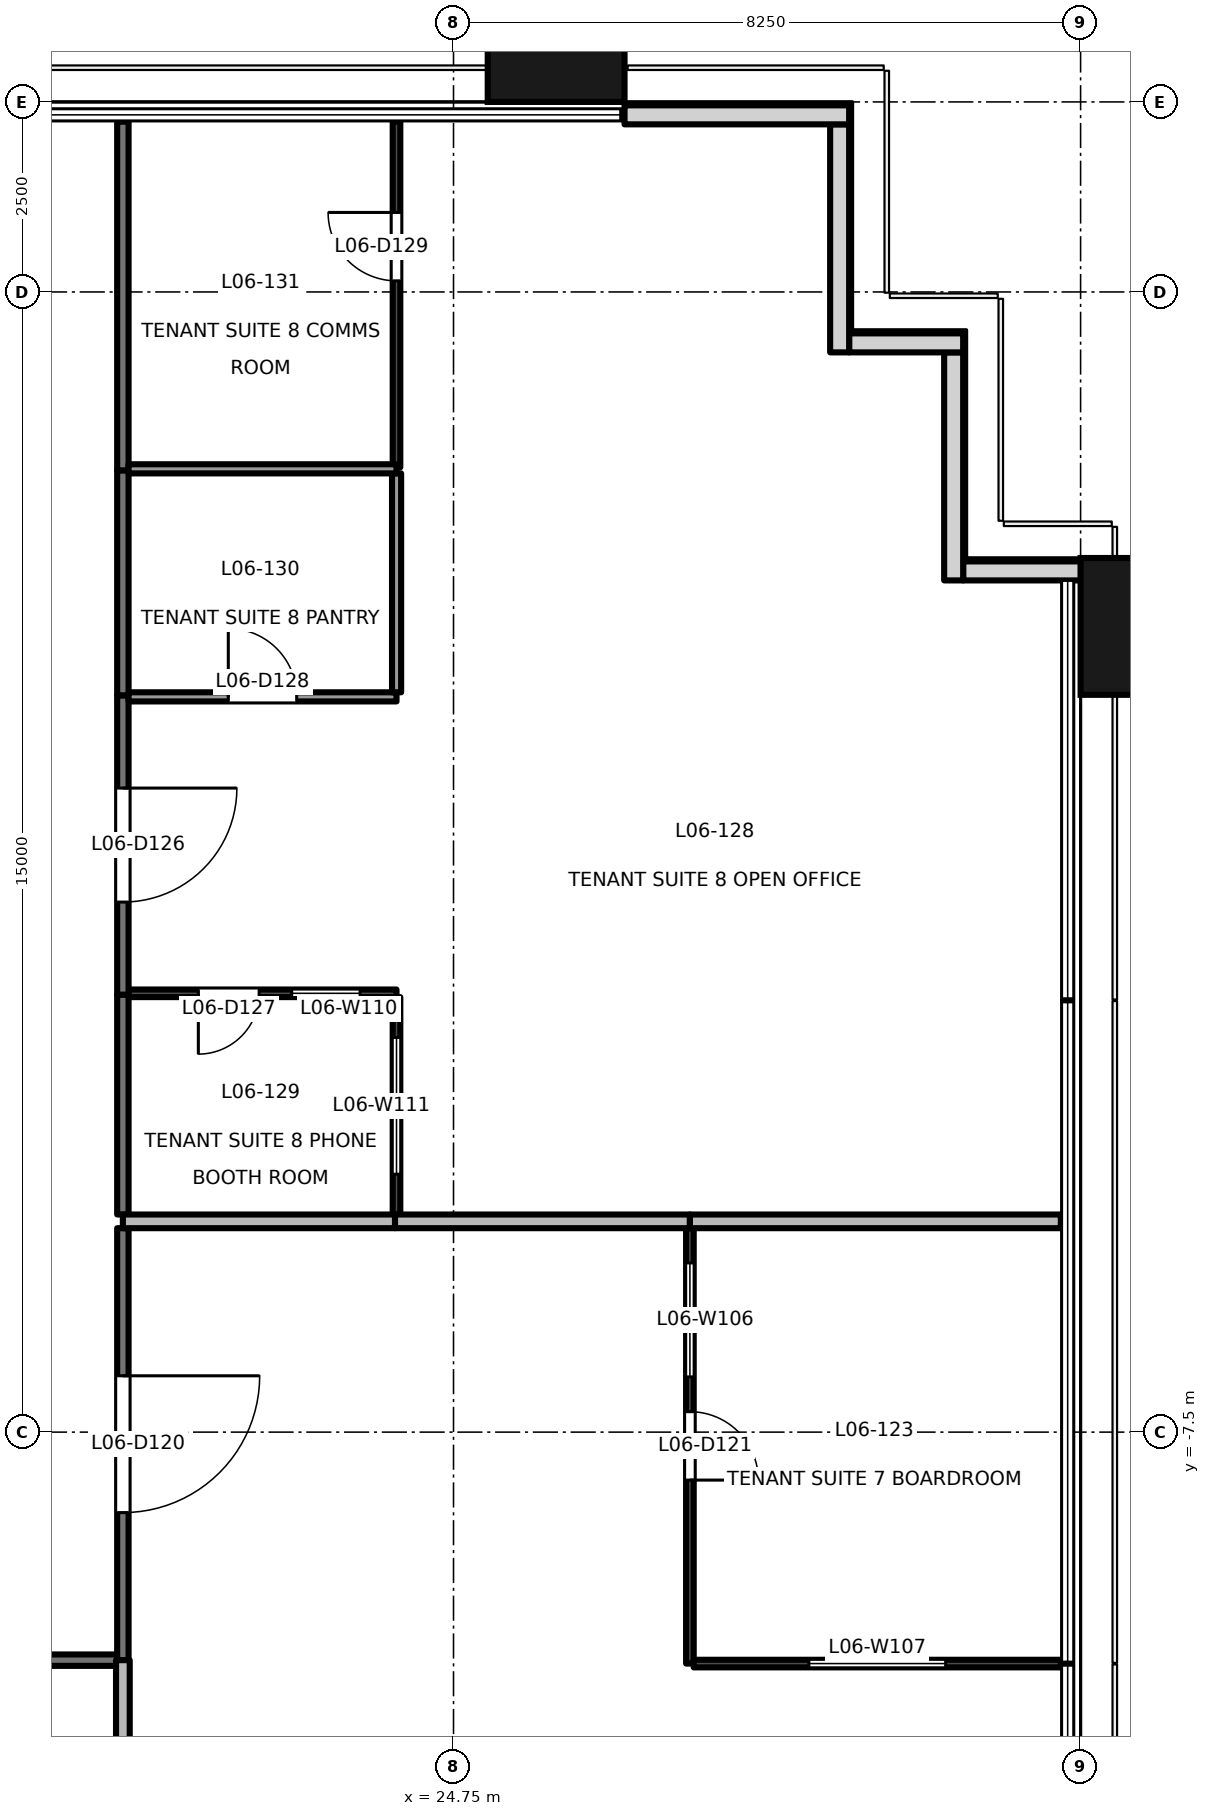
"""IFC4 building model, lengths in metres.
Left out: names, types, materials, properties, quantities, classifications, styles, units other than length and angle.
Written with IfcOpenShell. Run it as: python <this file> out.ifc"""

import sys

from ifc_helpers import new_model, si_unit, direction, frame, frame_2d, origin, origin_2d, place, context, subcontext, project, spatial, rectangle, extrude, element, fill, save


model = new_model("IFC4")
c1 = context("Model", 3, precision=1e-05, world=origin(), true_north=direction((0.0, 1.0)))
c2 = subcontext(c1, "Body", "Model", "MODEL_VIEW")
j1 = project(units=[si_unit("LENGTHUNIT", "METRE"), si_unit("PLANEANGLEUNIT", "RADIAN")], contexts=[c1])
p1 = place(None, origin())
s1 = spatial("IfcSite", under=j1, at=p1, CompositionType="ELEMENT")
p2 = place(p1, origin())
s2 = spatial("IfcBuilding", under=s1, at=p2, CompositionType="ELEMENT")
p3 = place(p2, frame((0.0, 0.0, 32.4)))
s3 = spatial("IfcBuildingStorey", under=s2, at=p3, CompositionType="ELEMENT", Elevation=32.4)
for number, where, z_axis, x_axis in (
    (1, (33.9, 3.1, -0.2), (0.0, 0.0, 1.0), (0.0, 1.0, 0.0)),
    (2, (26.1, 10.9, -0.2), (0.0, 0.0, 1.0), (1.0, 0.0, 0.0)),
):
    element("IfcColumn", number, at=place(p3, frame(where, z_axis=z_axis, x_axis=x_axis)), inside=s3, PredefinedType="COLUMN", context=c2, shape_type="SweptSolid", body=[
        extrude(rectangle(XDim=1.8, YDim=1.8, at=origin_2d()), origin(), (0.0, 0.0, 1.0), 4.1),
    ])
p4 = place(p3, frame((33.005, 3.83, 0.0), z_axis=(0.0, 0.0, 1.0), x_axis=(-1.0, 0.0, 0.0)))
e3 = element("IfcWall", 3, at=p4, inside=s3, PredefinedType="SOLIDWALL", context=c2, shape_type="SweptSolid", body=[
    extrude(rectangle(XDim=1.55, YDim=0.25, at=frame_2d((0.775, 0.0))), origin(), (0.0, 0.0, 1.0), 3.9),
])
p5 = place(p3, frame((31.33, 3.705, 0.0), z_axis=(0.0, 0.0, 1.0), x_axis=(0.0, 1.0, 0.0)))
e4 = element("IfcWall", 4, at=p5, inside=s3, PredefinedType="SOLIDWALL", context=c2, shape_type="SweptSolid", body=[
    extrude(rectangle(XDim=3.0, YDim=0.25, at=frame_2d((1.5, 0.0))), origin(), (0.0, 0.0, 1.0), 3.9),
])
p6 = place(p3, frame((31.455, 6.83, 0.0), z_axis=(0.0, 0.0, 1.0), x_axis=(-1.0, 0.0, 0.0)))
e5 = element("IfcWall", 5, at=p6, inside=s3, PredefinedType="SOLIDWALL", context=c2, shape_type="SweptSolid", body=[
    extrude(rectangle(XDim=1.5, YDim=0.25, at=frame_2d((0.75, 0.0))), origin(), (0.0, 0.0, 1.0), 3.9),
])
p7 = place(p3, frame((29.83, 6.705, 0.0), z_axis=(0.0, 0.0, 1.0), x_axis=(0.0, 1.0, 0.0)))
e6 = element("IfcWall", 6, at=p7, inside=s3, PredefinedType="SOLIDWALL", context=c2, shape_type="SweptSolid", body=[
    extrude(rectangle(XDim=3.0, YDim=0.25, at=frame_2d((1.5, 0.0))), origin(), (0.0, 0.0, 1.0), 3.9),
])
p8 = place(p3, frame((29.955, 9.83, 0.0), z_axis=(0.0, 0.0, 1.0), x_axis=(-1.0, 0.0, 0.0)))
e7 = element("IfcWall", 7, at=p8, inside=s3, PredefinedType="SOLIDWALL", context=c2, shape_type="SweptSolid", body=[
    extrude(rectangle(XDim=2.955, YDim=0.25, at=frame_2d((1.478, 0.0))), origin(), (0.0, 0.0, 1.0), 3.9),
])
p9 = place(p3, frame((20.325, -10.5, 0.0), z_axis=(0.0, 0.0, 1.0), x_axis=(-1.0, 0.0, 0.0)))
e8 = element("IfcWall", 8, at=p9, inside=s3, PredefinedType="PARTITIONING", context=c2, shape_type="SweptSolid", body=[
    extrude(rectangle(XDim=4.445, YDim=0.15, at=frame_2d((2.223, 0.0))), origin(), (0.0, 0.0, 1.0), 2.5),
])
p10 = place(p3, frame((20.4, -4.817, 0.0), z_axis=(0.0, 0.0, 1.0), x_axis=(0.0, -1.0, 0.0)))
e9 = element("IfcWall", 9, at=p10, inside=s3, PredefinedType="PARTITIONING", context=c2, shape_type="SweptSolid", body=[
    extrude(rectangle(XDim=5.683, YDim=0.15, at=frame_2d((2.842, 0.0))), origin(), (0.0, 0.0, 1.0), 3.3),
])
p11 = place(p10, frame((1.942, 0.0, 0.0)))
e10 = element("IfcOpeningElement", 10, at=p11, cuts=e9, PredefinedType="OPENING", context=c2, shape_type="SweptSolid", body=[
    extrude(rectangle(XDim=1.8, YDim=2.1, at=frame_2d((0.9, 1.05))), frame((0.0, 0.085, 0.0), z_axis=(0.0, -1.0, 0.0), x_axis=(1.0, 0.0, 0.0)), (0.0, 0.0, 1.0), 0.171),
])
p12 = place(p3, frame((20.4, 2.193, 0.0), z_axis=(0.0, 0.0, 1.0), x_axis=(0.0, -1.0, 0.0)))
e11 = element("IfcWall", 11, at=p12, inside=s3, PredefinedType="PARTITIONING", context=c2, shape_type="SweptSolid", body=[
    extrude(rectangle(XDim=3.94, YDim=0.15, at=frame_2d((1.97, 0.0))), origin(), (0.0, 0.0, 1.0), 3.3),
])
p13 = place(p12, frame((1.22, 0.0, 0.0)))
e12 = element("IfcOpeningElement", 12, at=p13, cuts=e11, PredefinedType="OPENING", context=c2, shape_type="SweptSolid", body=[
    extrude(rectangle(XDim=1.5, YDim=2.1, at=frame_2d((0.75, 1.05))), frame((0.0, 0.085, 0.0), z_axis=(0.0, -1.0, 0.0), x_axis=(1.0, 0.0, 0.0)), (0.0, 0.0, 1.0), 0.171),
])
p14 = place(p3, frame((20.4, -1.747, 0.0), z_axis=(0.0, 0.0, 1.0), x_axis=(0.0, -1.0, 0.0)))
e13 = element("IfcWall", 13, at=p14, inside=s3, PredefinedType="PARTITIONING", context=c2, shape_type="SweptSolid", body=[
    extrude(rectangle(XDim=2.89, YDim=0.15, at=frame_2d((1.445, 0.0))), origin(), (0.0, 0.0, 1.0), 3.3),
])
p15 = place(p3, frame((20.4, 5.153, 0.0), z_axis=(0.0, 0.0, 1.0), x_axis=(0.0, -1.0, 0.0)))
e14 = element("IfcWall", 14, at=p15, inside=s3, PredefinedType="PARTITIONING", context=c2, shape_type="SweptSolid", body=[
    extrude(rectangle(XDim=2.96, YDim=0.15, at=frame_2d((1.48, 0.0))), origin(), (0.0, 0.0, 1.0), 3.9),
])
p16 = place(p3, frame((20.4, 9.74, 0.0), z_axis=(0.0, 0.0, 1.0), x_axis=(0.0, -1.0, 0.0)))
e15 = element("IfcWall", 15, at=p16, inside=s3, PredefinedType="PARTITIONING", context=c2, shape_type="SweptSolid", body=[
    extrude(rectangle(XDim=4.587, YDim=0.15, at=frame_2d((2.293, 0.0))), origin(), (0.0, 0.0, 1.0), 3.9),
])
p17 = place(p3, frame((20.4, -10.5, 0.0), z_axis=(0.0, 0.0, 1.0), x_axis=(0.0, -1.0, 0.0)))
e16 = element("IfcWall", 16, at=p17, inside=s3, PredefinedType="PARTITIONING", context=c2, shape_type="SweptSolid", body=[
    extrude(rectangle(XDim=4.5, YDim=0.18, at=frame_2d((2.25, 0.0))), origin(), (0.0, 0.0, 1.0), 3.3),
])
p18 = place(p3, frame((27.86, -4.817, 0.0), z_axis=(0.0, 0.0, 1.0), x_axis=(0.0, -1.0, 0.0)))
e17 = element("IfcWall", 17, at=p18, inside=s3, PredefinedType="PARTITIONING", context=c2, shape_type="SweptSolid", body=[
    extrude(rectangle(XDim=5.728, YDim=0.1, at=frame_2d((2.864, 0.0))), origin(), (0.0, 0.0, 1.0), 3.3),
])
p19 = place(p18, frame((2.414, 0.0, 0.0)))
e18 = element("IfcOpeningElement", 18, at=p19, cuts=e17, PredefinedType="OPENING", context=c2, shape_type="SweptSolid", body=[
    extrude(rectangle(XDim=0.9, YDim=2.1, at=frame_2d((0.45, 1.05))), frame((0.0, 0.061, 0.0), z_axis=(0.0, -1.0, 0.0), x_axis=(1.0, 0.0, 0.0)), (0.0, 0.0, 1.0), 0.121),
])
p20 = place(p18, frame((0.457, 0.0, 0.9)))
e19 = element("IfcOpeningElement", 19, at=p20, cuts=e17, PredefinedType="OPENING", context=c2, shape_type="SweptSolid", body=[
    extrude(rectangle(XDim=1.5, YDim=1.2, at=frame_2d((0.75, 0.6))), frame((0.0, 0.061, 0.0), z_axis=(0.0, -1.0, 0.0), x_axis=(1.0, 0.0, 0.0)), (0.0, 0.0, 1.0), 0.121),
])
p21 = place(p3, frame((27.91, -10.545, 0.0), z_axis=(0.0, 0.0, 1.0), x_axis=(1.0, 0.0, 0.0)))
e20 = element("IfcWall", 20, at=p21, inside=s3, PredefinedType="PARTITIONING", context=c2, shape_type="SweptSolid", body=[
    extrude(rectangle(XDim=4.83, YDim=0.1, at=frame_2d((2.415, 0.0))), origin(), (0.0, 0.0, 1.0), 3.9),
])
p22 = place(p21, frame((1.515, 0.0, 0.9)))
e21 = element("IfcOpeningElement", 21, at=p22, cuts=e20, PredefinedType="OPENING", context=c2, shape_type="SweptSolid", body=[
    extrude(rectangle(XDim=1.8, YDim=1.2, at=frame_2d((0.9, 0.6))), frame((0.0, 0.061, 0.0), z_axis=(0.0, -1.0, 0.0), x_axis=(1.0, 0.0, 0.0)), (0.0, 0.0, 1.0), 0.121),
])
p23 = place(p3, frame((23.98, -4.727, 0.0), z_axis=(0.0, 0.0, 1.0), x_axis=(1.0, 0.0, 0.0)))
e22 = element("IfcWall", 22, at=p23, inside=s3, PredefinedType="PARTITIONING", context=c2, shape_type="SweptSolid", body=[
    extrude(rectangle(XDim=3.88, YDim=0.18, at=frame_2d((1.94, 0.0))), origin(), (0.0, 0.0, 1.0), 3.3),
])
p24 = place(p3, frame((20.4, -4.727, 0.0), z_axis=(0.0, 0.0, 1.0), x_axis=(1.0, 0.0, 0.0)))
e23 = element("IfcWall", 23, at=p24, inside=s3, PredefinedType="PARTITIONING", context=c2, shape_type="SweptSolid", body=[
    extrude(rectangle(XDim=3.58, YDim=0.18, at=frame_2d((1.79, 0.0))), origin(), (0.0, 0.0, 1.0), 3.3),
])
p25 = place(p3, frame((27.86, -4.727, 0.0), z_axis=(0.0, 0.0, 1.0), x_axis=(1.0, 0.0, 0.0)))
e24 = element("IfcWall", 24, at=p25, inside=s3, PredefinedType="PARTITIONING", context=c2, shape_type="SweptSolid", body=[
    extrude(rectangle(XDim=4.88, YDim=0.18, at=frame_2d((2.44, 0.0))), origin(), (0.0, 0.0, 1.0), 3.3),
])
p26 = place(p3, frame((24.0, -1.727, 0.0), z_axis=(0.0, 0.0, 1.0), x_axis=(-1.0, 0.0, 0.0)))
e25 = element("IfcWall", 25, at=p26, inside=s3, PredefinedType="PARTITIONING", context=c2, shape_type="SweptSolid", body=[
    extrude(rectangle(XDim=3.525, YDim=0.1, at=frame_2d((1.762, 0.0))), origin(), (0.0, 0.0, 1.0), 3.9),
])
p27 = place(p26, frame((1.807, 0.0, 0.0)))
e26 = element("IfcOpeningElement", 26, at=p27, cuts=e25, PredefinedType="OPENING", context=c2, shape_type="SweptSolid", body=[
    extrude(rectangle(XDim=0.8, YDim=2.1, at=frame_2d((0.4, 1.05))), frame((0.0, 0.061, 0.0), z_axis=(0.0, -1.0, 0.0), x_axis=(1.0, 0.0, 0.0)), (0.0, 0.0, 1.0), 0.121),
])
p28 = place(p26, frame((0.479, 0.0, 0.9)))
e27 = element("IfcOpeningElement", 27, at=p28, cuts=e25, PredefinedType="OPENING", context=c2, shape_type="SweptSolid", body=[
    extrude(rectangle(XDim=0.9, YDim=1.2, at=frame_2d((0.45, 0.6))), frame((0.0, 0.061, 0.0), z_axis=(0.0, -1.0, 0.0), x_axis=(1.0, 0.0, 0.0)), (0.0, 0.0, 1.0), 0.121),
])
p29 = place(p3, frame((24.0, -4.637, 0.0), z_axis=(0.0, 0.0, 1.0), x_axis=(0.0, 1.0, 0.0)))
e28 = element("IfcWall", 28, at=p29, inside=s3, PredefinedType="PARTITIONING", context=c2, shape_type="SweptSolid", body=[
    extrude(rectangle(XDim=2.86, YDim=0.1, at=frame_2d((1.43, 0.0))), origin(), (0.0, 0.0, 1.0), 3.3),
])
p30 = place(p29, frame((0.53, 0.0, 0.9)))
e29 = element("IfcOpeningElement", 29, at=p30, cuts=e28, PredefinedType="OPENING", context=c2, shape_type="SweptSolid", body=[
    extrude(rectangle(XDim=1.8, YDim=1.2, at=frame_2d((0.9, 0.6))), frame((0.0, 0.061, 0.0), z_axis=(0.0, -1.0, 0.0), x_axis=(1.0, 0.0, 0.0)), (0.0, 0.0, 1.0), 0.121),
])
p31 = place(p3, frame((20.475, 2.173, 0.0), z_axis=(0.0, 0.0, 1.0), x_axis=(1.0, 0.0, 0.0)))
e30 = element("IfcWall", 30, at=p31, inside=s3, PredefinedType="PARTITIONING", context=c2, shape_type="SweptSolid", body=[
    extrude(rectangle(XDim=3.525, YDim=0.12, at=frame_2d((1.762, 0.0))), origin(), (0.0, 0.0, 1.0), 3.9),
])
p32 = place(p31, frame((1.312, 0.0, 0.0)))
e31 = element("IfcOpeningElement", 31, at=p32, cuts=e30, PredefinedType="OPENING", context=c2, shape_type="SweptSolid", body=[
    extrude(rectangle(XDim=0.9, YDim=2.1, at=frame_2d((0.45, 1.05))), frame((0.0, 0.071, 0.0), z_axis=(0.0, -1.0, 0.0), x_axis=(1.0, 0.0, 0.0)), (0.0, 0.0, 1.0), 0.141),
])
p33 = place(p3, frame((24.001, 2.233, 0.0), z_axis=(0.0, 0.0, 1.0), x_axis=(0.0, 1.0, 0.0)))
e32 = element("IfcWall", 32, at=p33, inside=s3, PredefinedType="PARTITIONING", context=c2, shape_type="SweptSolid", body=[
    extrude(rectangle(XDim=2.88, YDim=0.12, at=frame_2d((1.44, 0.0))), origin(), (0.0, 0.0, 1.0), 3.9),
])
p34 = place(p3, frame((24.0, 5.193, 0.0), z_axis=(0.0, 0.0, 1.0), x_axis=(0.0, 1.0, 0.0)))
e33 = element("IfcWall", 33, at=p34, inside=s3, PredefinedType="PARTITIONING", context=c2, shape_type="SweptSolid", body=[
    extrude(rectangle(XDim=4.547, YDim=0.1, at=frame_2d((2.273, 0.0))), origin(), (0.0, 0.0, 1.0), 3.9),
])
p35 = place(p34, frame((2.453, 0.0, 0.0)))
e34 = element("IfcOpeningElement", 34, at=p35, cuts=e33, PredefinedType="OPENING", context=c2, shape_type="SweptSolid", body=[
    extrude(rectangle(XDim=0.9, YDim=2.1, at=frame_2d((0.45, 1.05))), frame((0.0, 0.061, 0.0), z_axis=(0.0, -1.0, 0.0), x_axis=(1.0, 0.0, 0.0)), (0.0, 0.0, 1.0), 0.121),
])
p36 = place(p3, frame((20.475, 5.173, 0.0), z_axis=(0.0, 0.0, 1.0), x_axis=(1.0, 0.0, 0.0)))
e35 = element("IfcWall", 35, at=p36, inside=s3, PredefinedType="PARTITIONING", context=c2, shape_type="SweptSolid", body=[
    extrude(rectangle(XDim=3.525, YDim=0.12, at=frame_2d((1.762, 0.0))), origin(), (0.0, 0.0, 1.0), 3.9),
])
p37 = place(p11, origin())
e36 = element("IfcDoor", 36, at=p37, inside=s3, OperationType="DOUBLE_DOOR_SINGLE_SWING", PredefinedType="DOOR", context=c2, shape_type="SweptSolid", body=[
    extrude(rectangle(XDim=1.8, YDim=2.1, at=frame_2d((0.9, 1.05))), frame((0.0, 0.025, 0.0), z_axis=(0.0, -1.0, 0.0), x_axis=(1.0, 0.0, 0.0)), (0.0, 0.0, 1.0), 0.05),
])
fill(e10, e36)
p38 = place(p19, origin())
e37 = element("IfcDoor", 37, at=p38, inside=s3, OperationType="SINGLE_SWING_RIGHT", PredefinedType="DOOR", context=c2, shape_type="SweptSolid", body=[
    extrude(rectangle(XDim=0.9, YDim=2.1, at=frame_2d((0.45, 1.05))), frame((0.0, 0.025, 0.0), z_axis=(0.0, -1.0, 0.0), x_axis=(1.0, 0.0, 0.0)), (0.0, 0.0, 1.0), 0.05),
])
fill(e18, e37)
p39 = place(p13, origin())
e38 = element("IfcDoor", 38, at=p39, inside=s3, OperationType="DOUBLE_DOOR_SINGLE_SWING", PredefinedType="DOOR", context=c2, shape_type="SweptSolid", body=[
    extrude(rectangle(XDim=1.5, YDim=2.1, at=frame_2d((0.75, 1.05))), frame((0.0, 0.025, 0.0), z_axis=(0.0, -1.0, 0.0), x_axis=(1.0, 0.0, 0.0)), (0.0, 0.0, 1.0), 0.05),
])
fill(e12, e38)
p40 = place(p27, origin())
e39 = element("IfcDoor", 39, at=p40, inside=s3, OperationType="SINGLE_SWING_RIGHT", PredefinedType="DOOR", context=c2, shape_type="SweptSolid", body=[
    extrude(rectangle(XDim=0.8, YDim=2.1, at=frame_2d((0.4, 1.05))), frame((0.0, 0.025, 0.0), z_axis=(0.0, -1.0, 0.0), x_axis=(1.0, 0.0, 0.0)), (0.0, 0.0, 1.0), 0.05),
])
fill(e26, e39)
p41 = place(p32, origin())
e40 = element("IfcDoor", 40, at=p41, inside=s3, OperationType="SINGLE_SWING_LEFT", PredefinedType="DOOR", context=c2, shape_type="SweptSolid", body=[
    extrude(rectangle(XDim=0.9, YDim=2.1, at=frame_2d((0.45, 1.05))), frame((0.0, 0.025, 0.0), z_axis=(0.0, -1.0, 0.0), x_axis=(1.0, 0.0, 0.0)), (0.0, 0.0, 1.0), 0.05),
])
fill(e31, e40)
p42 = place(p35, origin())
e41 = element("IfcDoor", 41, at=p42, inside=s3, OperationType="SINGLE_SWING_RIGHT", PredefinedType="DOOR", context=c2, shape_type="SweptSolid", body=[
    extrude(rectangle(XDim=0.9, YDim=2.1, at=frame_2d((0.45, 1.05))), frame((0.0, 0.025, 0.0), z_axis=(0.0, -1.0, 0.0), x_axis=(1.0, 0.0, 0.0)), (0.0, 0.0, 1.0), 0.05),
])
fill(e34, e41)
p43 = place(p20, origin())
e42 = element("IfcWindow", 42, at=p43, inside=s3, PartitioningType="SINGLE_PANEL", PredefinedType="WINDOW", context=c2, shape_type="SweptSolid", body=[
    extrude(rectangle(XDim=1.5, YDim=1.2, at=frame_2d((0.75, 0.6))), frame((0.0, 0.03, 0.0), z_axis=(0.0, -1.0, 0.0), x_axis=(1.0, 0.0, 0.0)), (0.0, 0.0, 1.0), 0.06),
])
fill(e19, e42)
p44 = place(p22, origin())
e43 = element("IfcWindow", 43, at=p44, inside=s3, PartitioningType="SINGLE_PANEL", PredefinedType="WINDOW", context=c2, shape_type="SweptSolid", body=[
    extrude(rectangle(XDim=1.8, YDim=1.2, at=frame_2d((0.9, 0.6))), frame((0.0, 0.03, 0.0), z_axis=(0.0, -1.0, 0.0), x_axis=(1.0, 0.0, 0.0)), (0.0, 0.0, 1.0), 0.06),
])
fill(e21, e43)
p45 = place(p28, origin())
e44 = element("IfcWindow", 44, at=p45, inside=s3, PartitioningType="SINGLE_PANEL", PredefinedType="WINDOW", context=c2, shape_type="SweptSolid", body=[
    extrude(rectangle(XDim=0.9, YDim=1.2, at=frame_2d((0.45, 0.6))), frame((0.0, 0.03, 0.0), z_axis=(0.0, -1.0, 0.0), x_axis=(1.0, 0.0, 0.0)), (0.0, 0.0, 1.0), 0.06),
])
fill(e27, e44)
p46 = place(p30, origin())
e45 = element("IfcWindow", 45, at=p46, inside=s3, PartitioningType="SINGLE_PANEL", PredefinedType="WINDOW", context=c2, shape_type="SweptSolid", body=[
    extrude(rectangle(XDim=1.8, YDim=1.2, at=frame_2d((0.9, 0.6))), frame((0.0, 0.03, 0.0), z_axis=(0.0, -1.0, 0.0), x_axis=(1.0, 0.0, 0.0)), (0.0, 0.0, 1.0), 0.06),
])
fill(e29, e45)
save(model, sys.argv[1])
